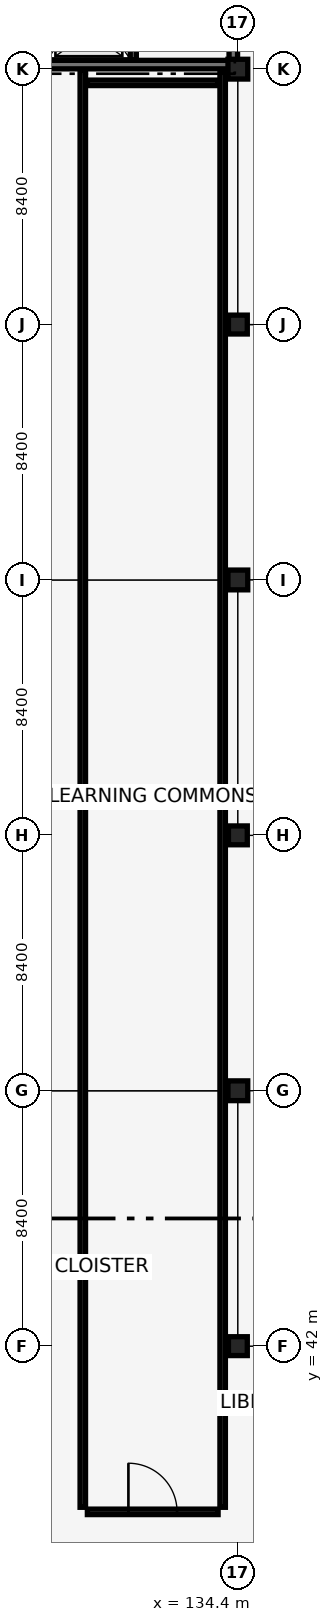
"""IFC4 building model, lengths in metres.
Left out: names, types, materials, properties, quantities, classifications, styles, units other than length and angle.
Written with IfcOpenShell. Run it as: python <this file> out.ifc"""

import sys

from ifc_helpers import new_model, si_unit, direction, frame, frame_2d, origin, origin_2d, place, context, subcontext, project, spatial, rectangle, extrude, element, fill, save


model = new_model("IFC4")
c1 = context("Model", 3, precision=1e-05, world=origin(), true_north=direction((0.0, 1.0)))
c2 = subcontext(c1, "Body", "Model", "MODEL_VIEW")
j1 = project(units=[si_unit("LENGTHUNIT", "METRE"), si_unit("PLANEANGLEUNIT", "RADIAN")], contexts=[c1])
p1 = place(None, origin())
s1 = spatial("IfcSite", under=j1, at=p1, CompositionType="ELEMENT")
p2 = place(p1, origin())
s2 = spatial("IfcBuilding", under=s1, at=p2, CompositionType="ELEMENT")
p3 = place(p2, frame((0.0, 0.0, 13.94)))
s3 = spatial("IfcBuildingStorey", under=s2, at=p3, CompositionType="ELEMENT", Elevation=13.94)
p4 = place(p3, frame((126.15, 84.15, 0.0), z_axis=(0.0, 0.0, 1.0), x_axis=(1.0, 0.0, 0.0)))
e1 = element("IfcWall", 1, at=p4, inside=s3, PredefinedType="SHEAR", context=c2, shape_type="SweptSolid", body=[
    extrude(rectangle(XDim=8.1, YDim=0.28, at=frame_2d((4.05, 0.0))), origin(), (0.0, 0.0, 1.0), 3.78),
])
p5 = place(p4, frame((0.485, 0.0, 0.0)))
e2 = element("IfcOpeningElement", 2, at=p5, cuts=e1, PredefinedType="OPENING", context=c2, shape_type="SweptSolid", body=[
    extrude(rectangle(XDim=1.0, YDim=2.15, at=frame_2d((0.5, 1.075))), frame((0.0, 0.15, 0.0), z_axis=(0.0, -1.0, 0.0), x_axis=(1.0, 0.0, 0.0)), (0.0, 0.0, 1.0), 0.3),
])
p6 = place(p3, frame((134.25, 84.15, 0.0), z_axis=(0.0, 0.0, 1.0), x_axis=(0.0, 1.0, 0.0)))
e3 = element("IfcWall", 3, at=p6, inside=s3, PredefinedType="SHEAR", context=c2, shape_type="SweptSolid", body=[
    extrude(rectangle(XDim=8.1, YDim=0.28, at=frame_2d((4.05, 0.0))), origin(), (0.0, 0.0, 1.0), 3.78),
])
p7 = place(p6, frame((1.325, 0.0, 0.0)))
e4 = element("IfcOpeningElement", 4, at=p7, cuts=e3, PredefinedType="OPENING", context=c2, shape_type="SweptSolid", body=[
    extrude(rectangle(XDim=1.45, YDim=2.15, at=frame_2d((0.725, 1.075))), frame((0.0, 0.15, 0.0), z_axis=(0.0, -1.0, 0.0), x_axis=(1.0, 0.0, 0.0)), (0.0, 0.0, 1.0), 0.3),
])
p8 = place(p3, frame((134.4, 42.0, 0.0), z_axis=(0.0, 0.0, 1.0), x_axis=(1.0, 0.0, 0.0)))
e5 = element("IfcColumn", 5, at=p8, inside=s3, PredefinedType="COLUMN", context=c2, shape_type="SweptSolid", body=[
    extrude(rectangle(XDim=0.62, YDim=0.62, at=origin_2d()), origin(), (0.0, 0.0, 1.0), 3.78),
])
p9 = place(p3, frame((134.4, 50.4, 0.0), z_axis=(0.0, 0.0, 1.0), x_axis=(1.0, 0.0, 0.0)))
e6 = element("IfcColumn", 6, at=p9, inside=s3, PredefinedType="COLUMN", context=c2, shape_type="SweptSolid", body=[
    extrude(rectangle(XDim=0.65, YDim=0.65, at=origin_2d()), origin(), (0.0, 0.0, 1.0), 3.78),
])
p10 = place(p3, frame((134.4, 58.8, 0.0), z_axis=(0.0, 0.0, 1.0), x_axis=(1.0, 0.0, 0.0)))
e7 = element("IfcColumn", 7, at=p10, inside=s3, PredefinedType="COLUMN", context=c2, shape_type="SweptSolid", body=[
    extrude(rectangle(XDim=0.62, YDim=0.62, at=origin_2d()), origin(), (0.0, 0.0, 1.0), 3.78),
])
p11 = place(p3, frame((134.4, 67.2, 0.0), z_axis=(0.0, 0.0, 1.0), x_axis=(1.0, 0.0, 0.0)))
e8 = element("IfcColumn", 8, at=p11, inside=s3, PredefinedType="COLUMN", context=c2, shape_type="SweptSolid", body=[
    extrude(rectangle(XDim=0.65, YDim=0.65, at=origin_2d()), origin(), (0.0, 0.0, 1.0), 3.78),
])
p12 = place(p3, frame((134.4, 75.6, 0.0), z_axis=(0.0, 0.0, 1.0), x_axis=(1.0, 0.0, 0.0)))
e9 = element("IfcColumn", 9, at=p12, inside=s3, PredefinedType="COLUMN", context=c2, shape_type="SweptSolid", body=[
    extrude(rectangle(XDim=0.62, YDim=0.62, at=origin_2d()), origin(), (0.0, 0.0, 1.0), 3.78),
])
p13 = place(p3, frame((134.4, 84.0, 0.0), z_axis=(0.0, 0.0, 1.0), x_axis=(1.0, 0.0, 0.0)))
e10 = element("IfcColumn", 10, at=p13, inside=s3, PredefinedType="COLUMN", context=c2, shape_type="SweptSolid", body=[
    extrude(rectangle(XDim=0.65, YDim=0.65, at=origin_2d()), origin(), (0.0, 0.0, 1.0), 3.78),
])
p14 = place(p3, frame((130.96, 84.3, 0.0), z_axis=(0.0, 0.0, 1.0), x_axis=(0.0, 1.0, 0.0)))
e11 = element("IfcWall", 11, at=p14, inside=s3, PredefinedType="SHEAR", context=c2, shape_type="SweptSolid", body=[
    extrude(rectangle(XDim=3.8, YDim=0.2, at=frame_2d((1.9, 0.0))), origin(), (0.0, 0.0, 1.0), 3.05),
])
p15 = place(p14, frame((0.375, 0.0, 0.0)))
e12 = element("IfcOpeningElement", 12, at=p15, cuts=e11, PredefinedType="OPENING", context=c2, shape_type="SweptSolid", body=[
    extrude(rectangle(XDim=1.1, YDim=2.15, at=frame_2d((0.55, 1.075))), frame((0.0, 0.11, 0.0), z_axis=(0.0, -1.0, 0.0), x_axis=(1.0, 0.0, 0.0)), (0.0, 0.0, 1.0), 0.22),
])
p16 = place(p14, frame((2.175, 0.0, 0.0)))
e13 = element("IfcOpeningElement", 13, at=p16, cuts=e11, PredefinedType="OPENING", context=c2, shape_type="SweptSolid", body=[
    extrude(rectangle(XDim=1.4, YDim=2.2, at=frame_2d((0.7, 1.1))), frame((0.0, 0.11, 0.0), z_axis=(0.0, -1.0, 0.0), x_axis=(1.0, 0.0, 0.0)), (0.0, 0.0, 1.0), 0.22),
])
p17 = place(p3, frame((129.45, 36.55, 0.0), z_axis=(0.0, 0.0, 1.0), x_axis=(1.0, 0.0, 0.0)))
e14 = element("IfcWall", 14, at=p17, inside=s3, PredefinedType="PARTITIONING", context=c2, shape_type="SweptSolid", body=[
    extrude(rectangle(XDim=4.3, YDim=0.18, at=frame_2d((2.15, 0.0))), origin(), (0.0, 0.0, 1.0), 3.78),
])
p18 = place(p17, frame((1.35, 0.0, 0.0)))
e15 = element("IfcOpeningElement", 15, at=p18, cuts=e14, PredefinedType="OPENING", context=c2, shape_type="SweptSolid", body=[
    extrude(rectangle(XDim=1.6, YDim=2.25, at=frame_2d((0.8, 1.125))), frame((0.0, 0.1, 0.0), z_axis=(0.0, -1.0, 0.0), x_axis=(1.0, 0.0, 0.0)), (0.0, 0.0, 1.0), 0.2),
])
p19 = place(p3, frame((129.45, 83.55, 0.0), z_axis=(0.0, 0.0, 1.0), x_axis=(1.0, 0.0, 0.0)))
e16 = element("IfcWall", 16, at=p19, inside=s3, PredefinedType="PARTITIONING", context=c2, shape_type="SweptSolid", body=[
    extrude(rectangle(XDim=4.3, YDim=0.18, at=frame_2d((2.15, 0.0))), origin(), (0.0, 0.0, 1.0), 3.78),
])
for number, where, z_axis, x_axis in (
    (17, (129.3, 36.7, 0.0), (0.0, 0.0, 1.0), (0.0, 1.0, 0.0)),
    (18, (133.9, 36.7, 0.0), (0.0, 0.0, 1.0), (0.0, 1.0, 0.0)),
):
    element("IfcWall", number, at=place(p3, frame(where, z_axis=z_axis, x_axis=x_axis)), inside=s3, PredefinedType="PARTITIONING", context=c2, shape_type="SweptSolid", body=[
        extrude(rectangle(XDim=47.27, YDim=0.18, at=frame_2d((23.635, 0.0))), origin(), (0.0, 0.0, 1.0), 3.05),
    ])
p20 = place(p18, origin())
e19 = element("IfcDoor", 19, at=p20, inside=s3, OperationType="DOUBLE_DOOR_SINGLE_SWING", PredefinedType="DOOR", context=c2, shape_type="SweptSolid", body=[
    extrude(rectangle(XDim=1.6, YDim=2.25, at=frame_2d((0.8, 1.125))), frame((0.0, 0.025, 0.0), z_axis=(0.0, -1.0, 0.0), x_axis=(1.0, 0.0, 0.0)), (0.0, 0.0, 1.0), 0.05),
])
fill(e15, e19)
save(model, sys.argv[1])
